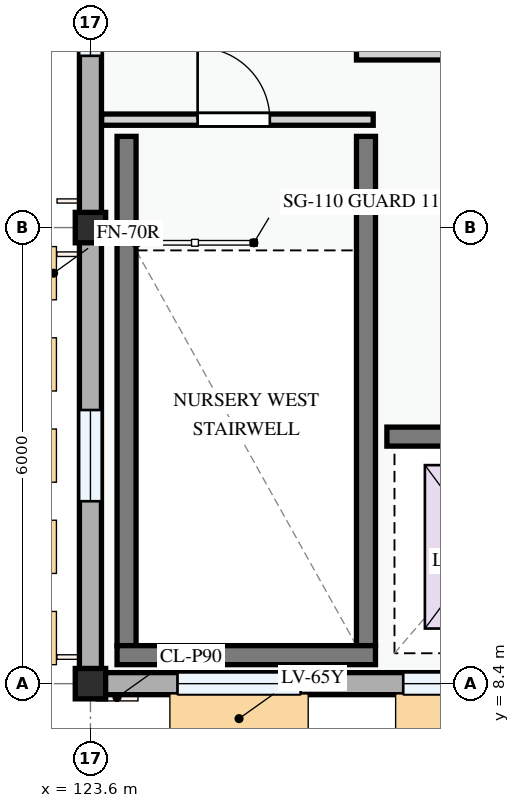
"""IFC4 building model, lengths in metres.
Left out: names, types, materials, properties, quantities, classifications, styles, units other than length and angle.
Written with IfcOpenShell. Run it as: python <this file> out.ifc"""

import sys

from ifc_helpers import new_model, si_unit, direction, frame, frame_2d, origin, origin_2d, place, context, subcontext, project, spatial, rectangle, extrude, element, fill, save


model = new_model("IFC4")
c1 = context("Model", 3, precision=1e-05, world=origin(), true_north=direction((0.0, 1.0)))
c2 = subcontext(c1, "Body", "Model", "MODEL_VIEW")
j1 = project(units=[si_unit("LENGTHUNIT", "METRE"), si_unit("PLANEANGLEUNIT", "RADIAN")], contexts=[c1])
p1 = place(None, origin())
s1 = spatial("IfcSite", under=j1, at=p1, CompositionType="ELEMENT")
p2 = place(p1, origin())
s2 = spatial("IfcBuilding", under=s1, at=p2, CompositionType="ELEMENT")
p3 = place(p2, frame((0.0, 0.0, 4.5)))
s3 = spatial("IfcBuildingStorey", under=s2, at=p3, CompositionType="ELEMENT", Elevation=4.5)
for number, where, z_axis, x_axis in (
    (1, (123.6, 8.4, 0.0), (0.0, 0.0, 1.0), (1.0, 0.0, 0.0)),
    (2, (123.6, 14.4, 0.0), (0.0, 0.0, 1.0), (1.0, 0.0, 0.0)),
):
    element("IfcColumn", number, at=place(p3, frame(where, z_axis=z_axis, x_axis=x_axis)), inside=s3, PredefinedType="COLUMN", context=c2, shape_type="SweptSolid", body=[
        extrude(rectangle(XDim=0.4, YDim=0.4, at=origin_2d()), origin(), (0.0, 0.0, 1.0), 3.6),
    ])
p4 = place(p3, frame((123.6, 8.4, 0.0), z_axis=(0.0, 0.0, 1.0), x_axis=(1.0, 0.0, 0.0)))
e3 = element("IfcWall", 3, at=p4, inside=s3, PredefinedType="STANDARD", context=c2, shape_type="SweptSolid", body=[
    extrude(rectangle(XDim=6.0, YDim=0.29, at=frame_2d((3.0, 0.0))), origin(), (0.0, 0.0, 1.0), 2.775),
])
p5 = place(p4, frame((1.145, 0.0, 0.72)))
e4 = element("IfcOpeningElement", 4, at=p5, cuts=e3, PredefinedType="OPENING", context=c2, shape_type="SweptSolid", body=[
    extrude(rectangle(XDim=1.62, YDim=1.38, at=frame_2d((0.81, 0.69))), frame((0.0, 0.155, 0.0), z_axis=(0.0, -1.0, 0.0), x_axis=(1.0, 0.0, 0.0)), (0.0, 0.0, 1.0), 0.31),
])
p6 = place(p4, frame((4.115, 0.0, 0.72)))
e5 = element("IfcOpeningElement", 5, at=p6, cuts=e3, PredefinedType="OPENING", context=c2, shape_type="SweptSolid", body=[
    extrude(rectangle(XDim=1.3, YDim=1.4, at=frame_2d((0.65, 0.7))), frame((0.0, 0.155, 0.0), z_axis=(0.0, -1.0, 0.0), x_axis=(1.0, 0.0, 0.0)), (0.0, 0.0, 1.0), 0.31),
])
p7 = place(p3, frame((123.6, 22.8, 0.0), z_axis=(0.0, 0.0, 1.0), x_axis=(0.0, -1.0, 0.0)))
e6 = element("IfcWall", 6, at=p7, inside=s3, PredefinedType="STANDARD", context=c2, shape_type="SweptSolid", body=[
    extrude(rectangle(XDim=8.4, YDim=0.29, at=frame_2d((4.2, 0.0))), origin(), (0.0, 0.0, 1.0), 2.725),
])
p8 = place(p7, frame((1.485, 0.0, 0.72)))
e7 = element("IfcOpeningElement", 7, at=p8, cuts=e6, PredefinedType="OPENING", context=c2, shape_type="SweptSolid", body=[
    extrude(rectangle(XDim=1.1, YDim=1.3, at=frame_2d((0.55, 0.65))), frame((0.0, 0.155, 0.0), z_axis=(0.0, -1.0, 0.0), x_axis=(1.0, 0.0, 0.0)), (0.0, 0.0, 1.0), 0.31),
])
p9 = place(p7, frame((4.72, 0.0, 0.72)))
e8 = element("IfcOpeningElement", 8, at=p9, cuts=e6, PredefinedType="OPENING", context=c2, shape_type="SweptSolid", body=[
    extrude(rectangle(XDim=1.42, YDim=1.38, at=frame_2d((0.71, 0.69))), frame((0.0, 0.155, 0.0), z_axis=(0.0, -1.0, 0.0), x_axis=(1.0, 0.0, 0.0)), (0.0, 0.0, 1.0), 0.31),
])
p10 = place(p3, frame((123.6, 14.4, 0.0), z_axis=(0.0, 0.0, 1.0), x_axis=(0.0, -1.0, 0.0)))
e9 = element("IfcWall", 9, at=p10, inside=s3, PredefinedType="STANDARD", context=c2, shape_type="SweptSolid", body=[
    extrude(rectangle(XDim=6.0, YDim=0.29, at=frame_2d((3.0, 0.0))), origin(), (0.0, 0.0, 1.0), 2.875),
])
p11 = place(p10, frame((2.4, 0.0, 0.72)))
e10 = element("IfcOpeningElement", 10, at=p11, cuts=e9, PredefinedType="OPENING", context=c2, shape_type="SweptSolid", body=[
    extrude(rectangle(XDim=1.2, YDim=1.35, at=frame_2d((0.6, 0.675))), frame((0.0, 0.155, 0.0), z_axis=(0.0, -1.0, 0.0), x_axis=(1.0, 0.0, 0.0)), (0.0, 0.0, 1.0), 0.31),
])
for number, where, z_axis, x_axis in (
    (11, (124.075, 15.6, 0.0), (0.0, 0.0, 1.0), (0.0, -1.0, 0.0)),
    (12, (127.225, 15.6, 0.0), (0.0, 0.0, 1.0), (0.0, -1.0, 0.0)),
):
    element("IfcWall", number, at=place(p3, frame(where, z_axis=z_axis, x_axis=x_axis)), inside=s3, PredefinedType="SHEAR", context=c2, shape_type="SweptSolid", body=[
        extrude(rectangle(XDim=6.7, YDim=0.25, at=frame_2d((3.35, 0.0))), origin(), (0.0, 0.0, 1.0), 3.3),
    ])
p12 = place(p3, frame((123.95, 8.775, 0.0), z_axis=(0.0, 0.0, 1.0), x_axis=(1.0, 0.0, 0.0)))
e13 = element("IfcWall", 13, at=p12, inside=s3, PredefinedType="SHEAR", context=c2, shape_type="SweptSolid", body=[
    extrude(rectangle(XDim=3.4, YDim=0.25, at=frame_2d((1.7, 0.0))), origin(), (0.0, 0.0, 1.0), 3.3),
])
p13 = place(p3, frame((127.1, 16.68, 0.0), z_axis=(0.0, 0.0, 1.0), x_axis=(1.0, 0.0, 0.0)))
e14 = element("IfcWall", 14, at=p13, inside=s3, PredefinedType="PARTITIONING", context=c2, shape_type="SweptSolid", body=[
    extrude(rectangle(XDim=36.2, YDim=0.15, at=frame_2d((18.1, 0.0))), origin(), (0.0, 0.0, 1.0), 3.3),
])
p14 = place(p13, frame((9.967, 0.0, 0.0)))
e15 = element("IfcOpeningElement", 15, at=p14, cuts=e14, PredefinedType="OPENING", context=c2, shape_type="SweptSolid", body=[
    extrude(rectangle(XDim=0.95, YDim=2.1, at=frame_2d((0.475, 1.05))), frame((0.0, 0.085, 0.0), z_axis=(0.0, -1.0, 0.0), x_axis=(1.0, 0.0, 0.0)), (0.0, 0.0, 1.0), 0.17),
])
p15 = place(p13, frame((25.283, 0.0, 0.0)))
e16 = element("IfcOpeningElement", 16, at=p15, cuts=e14, PredefinedType="OPENING", context=c2, shape_type="SweptSolid", body=[
    extrude(rectangle(XDim=0.95, YDim=2.1, at=frame_2d((0.475, 1.05))), frame((0.0, 0.085, 0.0), z_axis=(0.0, -1.0, 0.0), x_axis=(1.0, 0.0, 0.0)), (0.0, 0.0, 1.0), 0.17),
])
p16 = place(p3, frame((127.5, 11.65, 0.0), z_axis=(0.0, 0.0, 1.0), x_axis=(1.0, 0.0, 0.0)))
e17 = element("IfcWall", 17, at=p16, inside=s3, PredefinedType="SHEAR", context=c2, shape_type="SweptSolid", body=[
    extrude(rectangle(XDim=2.555, YDim=0.25, at=frame_2d((1.278, 0.0))), origin(), (0.0, 0.0, 1.0), 3.3),
])
p17 = place(p16, frame((0.75, 0.0, 0.0)))
e18 = element("IfcOpeningElement", 18, at=p17, cuts=e17, PredefinedType="OPENING", context=c2, shape_type="SweptSolid", body=[
    extrude(rectangle(XDim=1.0, YDim=2.15, at=frame_2d((0.5, 1.075))), frame((0.0, 0.135, 0.0), z_axis=(0.0, -1.0, 0.0), x_axis=(1.0, 0.0, 0.0)), (0.0, 0.0, 1.0), 0.27),
])
p18 = place(p3, frame((123.747, 15.82, 0.0), z_axis=(0.0, 0.0, 1.0), x_axis=(1.0, 0.0, 0.0)))
e19 = element("IfcWall", 19, at=p18, inside=s3, PredefinedType="PARTITIONING", context=c2, shape_type="SweptSolid", body=[
    extrude(rectangle(XDim=3.573, YDim=0.148, at=frame_2d((1.787, 0.0))), origin(), (0.0, 0.0, 1.0), 3.3),
])
p19 = place(p18, frame((1.263, 0.0, 0.0)))
e20 = element("IfcOpeningElement", 20, at=p19, cuts=e19, PredefinedType="OPENING", context=c2, shape_type="SweptSolid", body=[
    extrude(rectangle(XDim=0.95, YDim=2.1, at=frame_2d((0.475, 1.05))), frame((0.0, 0.084, 0.0), z_axis=(0.0, -1.0, 0.0), x_axis=(1.0, 0.0, 0.0)), (0.0, 0.0, 1.0), 0.168),
])
p20 = place(p5, origin())
e21 = element("IfcWindow", 21, at=p20, inside=s3, PartitioningType="DOUBLE_PANEL_VERTICAL", PredefinedType="WINDOW", context=c2, shape_type="SweptSolid", body=[
    extrude(rectangle(XDim=1.62, YDim=1.38, at=frame_2d((0.81, 0.69))), frame((0.0, 0.03, 0.0), z_axis=(0.0, -1.0, 0.0), x_axis=(1.0, 0.0, 0.0)), (0.0, 0.0, 1.0), 0.06),
])
fill(e4, e21)
p21 = place(p6, origin())
e22 = element("IfcWindow", 22, at=p21, inside=s3, PartitioningType="SINGLE_PANEL", PredefinedType="WINDOW", context=c2, shape_type="SweptSolid", body=[
    extrude(rectangle(XDim=1.3, YDim=1.4, at=frame_2d((0.65, 0.7))), frame((0.0, 0.03, 0.0), z_axis=(0.0, -1.0, 0.0), x_axis=(1.0, 0.0, 0.0)), (0.0, 0.0, 1.0), 0.06),
])
fill(e5, e22)
p22 = place(p9, origin())
e23 = element("IfcWindow", 23, at=p22, inside=s3, PartitioningType="SINGLE_PANEL", PredefinedType="WINDOW", context=c2, shape_type="SweptSolid", body=[
    extrude(rectangle(XDim=1.42, YDim=1.38, at=frame_2d((0.71, 0.69))), frame((0.0, 0.03, 0.0), z_axis=(0.0, -1.0, 0.0), x_axis=(1.0, 0.0, 0.0)), (0.0, 0.0, 1.0), 0.06),
])
fill(e8, e23)
p23 = place(p11, origin())
e24 = element("IfcWindow", 24, at=p23, inside=s3, PartitioningType="SINGLE_PANEL", PredefinedType="WINDOW", context=c2, shape_type="SweptSolid", body=[
    extrude(rectangle(XDim=1.2, YDim=1.35, at=frame_2d((0.6, 0.675))), frame((0.0, 0.03, 0.0), z_axis=(0.0, -1.0, 0.0), x_axis=(1.0, 0.0, 0.0)), (0.0, 0.0, 1.0), 0.06),
])
fill(e10, e24)
p24 = place(p19, origin())
e25 = element("IfcDoor", 25, at=p24, inside=s3, OperationType="SINGLE_SWING_LEFT", PredefinedType="DOOR", context=c2, shape_type="SweptSolid", body=[
    extrude(rectangle(XDim=0.95, YDim=2.1, at=frame_2d((0.475, 1.05))), frame((0.0, 0.025, 0.0), z_axis=(0.0, -1.0, 0.0), x_axis=(1.0, 0.0, 0.0)), (0.0, 0.0, 1.0), 0.05),
])
fill(e20, e25)
save(model, sys.argv[1])
